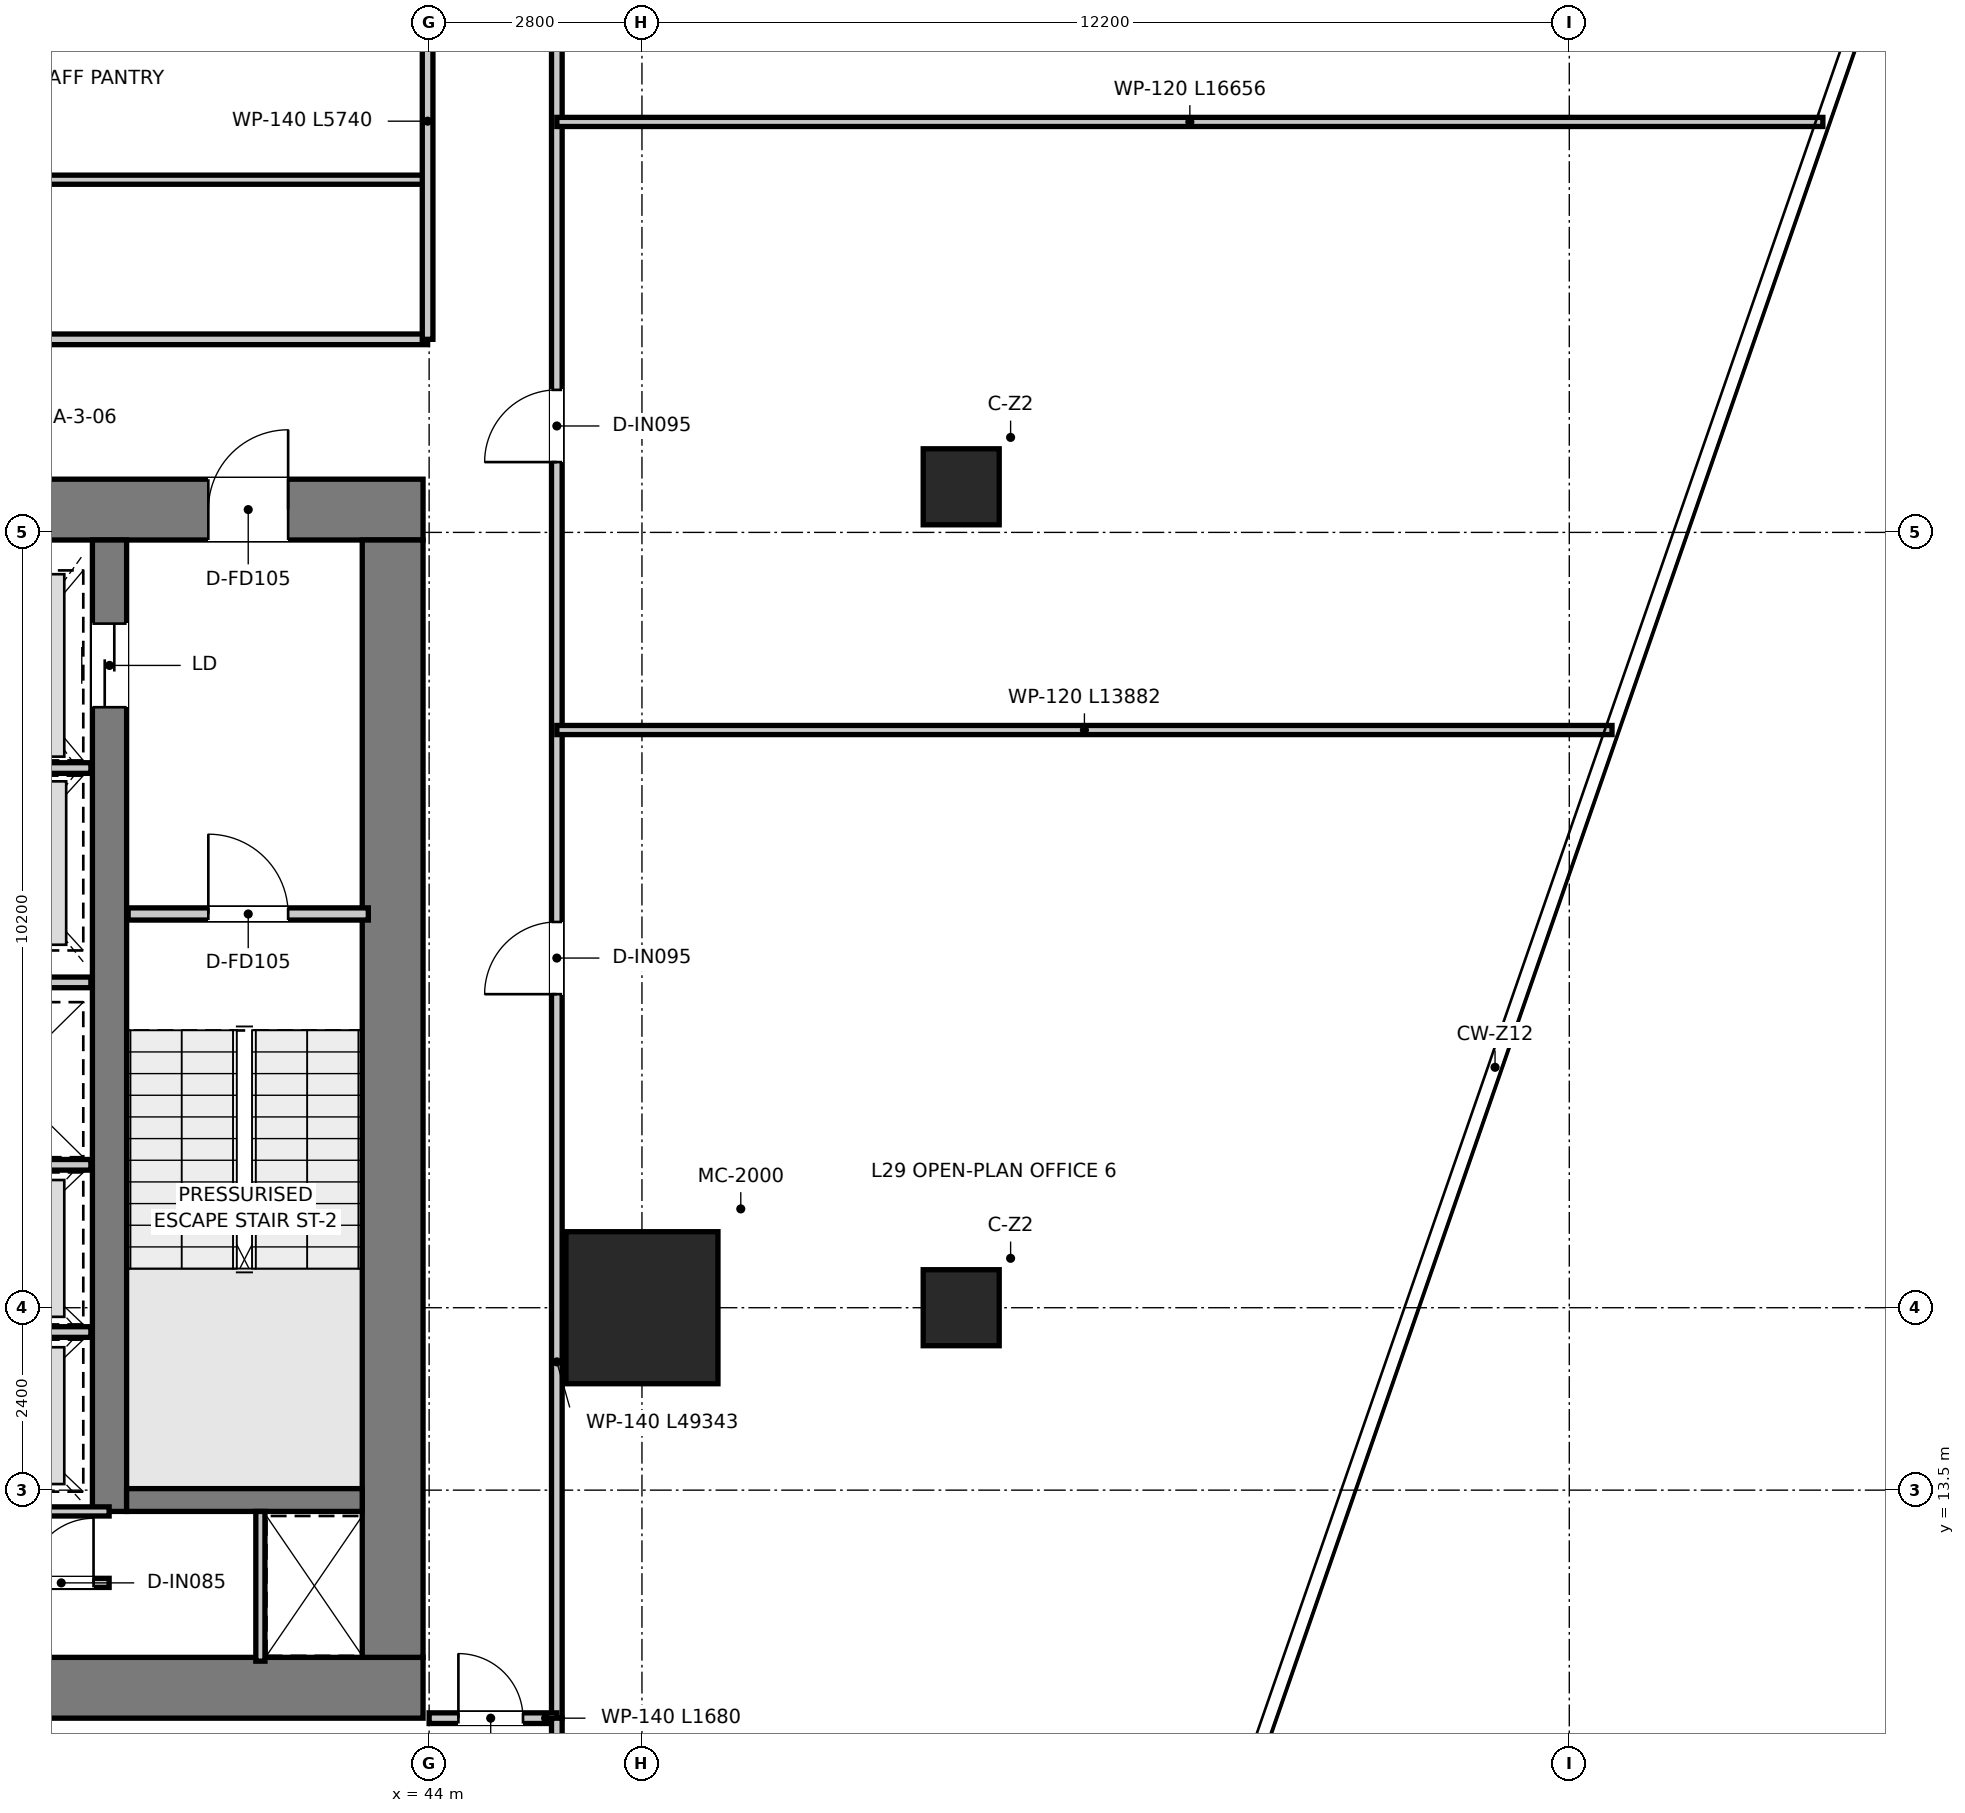
"""IFC4 building model, lengths in metres.
Left out: names, types, materials, properties, quantities, classifications, styles, units other than length and angle.
Written with IfcOpenShell. Run it as: python <this file> out.ifc"""

import sys

from ifc_helpers import new_model, si_unit, direction, frame, frame_2d, origin, origin_2d, place, context, subcontext, project, spatial, rectangle, extrude, source, transform, mapped, element, fill, save


model = new_model("IFC4")
c1 = context("Model", 3, precision=1e-05, world=origin(), true_north=direction((0.0, 1.0)))
c2 = subcontext(c1, "Body", "Model", "MODEL_VIEW")
j1 = project(units=[si_unit("LENGTHUNIT", "METRE"), si_unit("PLANEANGLEUNIT", "RADIAN")], contexts=[c1])
p1 = place(None, origin())
s1 = spatial("IfcSite", under=j1, at=p1, CompositionType="ELEMENT")
p2 = place(p1, origin())
s2 = spatial("IfcBuilding", under=s1, at=p2, CompositionType="ELEMENT")
p3 = place(p2, frame((0.0, 0.0, 121.65)))
s3 = spatial("IfcBuildingStorey", under=s2, at=p3, CompositionType="ELEMENT", Elevation=121.65)
p4 = place(p3, frame((28.08, 10.9, 0.0), z_axis=(0.0, 0.0, 1.0), x_axis=(1.0, 0.0, 0.0)))
e1 = element("IfcWall", 1, at=p4, inside=s3, PredefinedType="SHEAR", context=c2, shape_type="SweptSolid", body=[
    extrude(rectangle(XDim=15.84, YDim=0.8, at=frame_2d((7.92, 0.0))), origin(), (0.0, 0.0, 1.0), 3.95),
])
p5 = place(p3, frame((28.08, 26.4, 0.0), z_axis=(0.0, 0.0, 1.0), x_axis=(1.0, 0.0, 0.0)))
e2 = element("IfcWall", 2, at=p5, inside=s3, PredefinedType="SHEAR", context=c2, shape_type="SweptSolid", body=[
    extrude(rectangle(XDim=15.84, YDim=0.8, at=frame_2d((7.92, 0.0))), origin(), (0.0, 0.0, 1.0), 3.95),
])
p6 = place(p5, frame((7.22, 0.0, 0.0)))
e3 = element("IfcOpeningElement", 3, at=p6, cuts=e2, PredefinedType="OPENING", context=c2, shape_type="SweptSolid", body=[
    extrude(rectangle(XDim=1.4, YDim=2.2, at=frame_2d((0.7, 1.1))), frame((0.0, 0.41, 0.0), z_axis=(0.0, -1.0, 0.0), x_axis=(1.0, 0.0, 0.0)), (0.0, 0.0, 1.0), 0.82),
])
p7 = place(p5, frame((1.775, 0.0, 0.0)))
e4 = element("IfcOpeningElement", 4, at=p7, cuts=e2, PredefinedType="OPENING", context=c2, shape_type="SweptSolid", body=[
    extrude(rectangle(XDim=1.05, YDim=2.1, at=frame_2d((0.525, 1.05))), frame((0.0, 0.41, 0.0), z_axis=(0.0, -1.0, 0.0), x_axis=(1.0, 0.0, 0.0)), (0.0, 0.0, 1.0), 0.82),
])
p8 = place(p5, frame((13.015, 0.0, 0.0)))
e5 = element("IfcOpeningElement", 5, at=p8, cuts=e2, PredefinedType="OPENING", context=c2, shape_type="SweptSolid", body=[
    extrude(rectangle(XDim=1.05, YDim=2.1, at=frame_2d((0.525, 1.05))), frame((0.0, 0.41, 0.0), z_axis=(0.0, -1.0, 0.0), x_axis=(1.0, 0.0, 0.0)), (0.0, 0.0, 1.0), 0.82),
])
p9 = place(p3, frame((43.52, 11.3, 0.0), z_axis=(0.0, 0.0, 1.0), x_axis=(0.0, 1.0, 0.0)))
e6 = element("IfcWall", 6, at=p9, inside=s3, PredefinedType="SHEAR", context=c2, shape_type="SweptSolid", body=[
    extrude(rectangle(XDim=14.7, YDim=0.8, at=frame_2d((7.35, 0.0))), origin(), (0.0, 0.0, 1.0), 3.95),
])
p10 = place(p3, frame((39.795, 13.22, 0.0), z_axis=(0.0, 0.0, 1.0), x_axis=(0.0, 1.0, 0.0)))
e7 = element("IfcWall", 7, at=p10, inside=s3, PredefinedType="SHEAR", context=c2, shape_type="SweptSolid", body=[
    extrude(rectangle(XDim=12.78, YDim=0.45, at=frame_2d((6.39, 0.0))), origin(), (0.0, 0.0, 1.0), 3.95),
])
p11 = place(p10, frame((10.58, 0.0, 0.0)))
e8 = element("IfcOpeningElement", 8, at=p11, cuts=e7, PredefinedType="OPENING", context=c2, shape_type="SweptSolid", body=[
    extrude(rectangle(XDim=1.1, YDim=2.15, at=frame_2d((0.55, 1.075))), frame((0.0, 0.235, 0.0), z_axis=(0.0, -1.0, 0.0), x_axis=(1.0, 0.0, 0.0)), (0.0, 0.0, 1.0), 0.47),
])
p12 = place(p3, frame((40.02, 13.37, 0.0), z_axis=(0.0, 0.0, 1.0), x_axis=(1.0, 0.0, 0.0)))
e9 = element("IfcWall", 9, at=p12, inside=s3, PredefinedType="SHEAR", context=c2, shape_type="SweptSolid", body=[
    extrude(rectangle(XDim=3.1, YDim=0.3, at=frame_2d((1.55, 0.0))), origin(), (0.0, 0.0, 1.0), 3.95),
])
m1 = source(origin(), c2, "Body", "SweptSolid", [
    extrude(rectangle(XDim=2.0, YDim=2.0, at=origin_2d()), origin(), (0.0, 0.0, 1.0), 3.95),
])
p13 = place(p3, frame((46.8, 15.9, 0.0), z_axis=(0.0, 0.0, 1.0), x_axis=(1.0, 0.0, 0.0)))
e10 = element("IfcColumn", 10, at=p13, inside=s3, PredefinedType="USERDEFINED", context=c2, shape_type="MappedRepresentation", body=[
    mapped(m1, transform((0.0, 0.0, 0.0), x_axis=(1.0, 0.0, 0.0), y_axis=(0.0, 1.0, 0.0), z_axis=(0.0, 0.0, 1.0), scale=1.0)),
])
m2 = source(origin(), c2, "Body", "SweptSolid", [
    extrude(rectangle(XDim=1.0, YDim=1.0, at=origin_2d()), origin(), (0.0, 0.0, 1.0), 3.95),
])
for number, where, z_axis, x_axis in (
    (11, (51.0, 26.7, 0.0), (0.0, 0.0, 1.0), (1.0, 0.0, 0.0)),
    (12, (51.0, 15.9, 0.0), (0.0, 0.0, 1.0), (1.0, 0.0, 0.0)),
):
    element("IfcColumn", number, at=place(p3, frame(where, z_axis=z_axis, x_axis=x_axis)), inside=s3, PredefinedType="COLUMN", context=c2, shape_type="MappedRepresentation", body=[
        mapped(m2, transform((0.0, 0.0, 0.0), x_axis=(1.0, 0.0, 0.0), y_axis=(0.0, 1.0, 0.0), z_axis=(0.0, 0.0, 1.0), scale=1.0)),
    ])
p14 = place(p3, frame((40.04, 21.08, 0.0), z_axis=(0.0, 0.0, 1.0), x_axis=(1.0, 0.0, 0.0)))
e13 = element("IfcWall", 13, at=p14, inside=s3, PredefinedType="PARTITIONING", context=c2, shape_type="SweptSolid", body=[
    extrude(rectangle(XDim=3.16, YDim=0.16, at=frame_2d((1.58, 0.0))), origin(), (0.0, 0.0, 1.0), 3.67),
])
p15 = place(p14, frame((1.055, 0.0, 0.0)))
e14 = element("IfcOpeningElement", 14, at=p15, cuts=e13, PredefinedType="OPENING", context=c2, shape_type="SweptSolid", body=[
    extrude(rectangle(XDim=1.05, YDim=2.1, at=frame_2d((0.525, 1.05))), frame((0.0, 0.09, 0.0), z_axis=(0.0, -1.0, 0.0), x_axis=(1.0, 0.0, 0.0)), (0.0, 0.0, 1.0), 0.18),
])
p16 = place(p3, frame((37.28, 23.0, 0.0), z_axis=(0.0, 0.0, 1.0), x_axis=(1.0, 0.0, 0.0)))
e15 = element("IfcWall", 15, at=p16, inside=s3, PredefinedType="PARTITIONING", context=c2, shape_type="SweptSolid", body=[
    extrude(rectangle(XDim=2.27, YDim=0.14, at=frame_2d((1.135, 0.0))), origin(), (0.0, 0.0, 1.0), 2.67),
])
for number, where, z_axis, x_axis in (
    (16, (37.28, 17.78, 0.0), (0.0, 0.0, 1.0), (1.0, 0.0, 0.0)),
    (17, (37.28, 20.18, 0.0), (0.0, 0.0, 1.0), (1.0, 0.0, 0.0)),
    (18, (37.28, 15.58, 0.0), (0.0, 0.0, 1.0), (1.0, 0.0, 0.0)),
):
    element("IfcWall", number, at=place(p3, frame(where, z_axis=z_axis, x_axis=x_axis)), inside=s3, PredefinedType="PARTITIONING", context=c2, shape_type="SweptSolid", body=[
        extrude(rectangle(XDim=2.27, YDim=0.14, at=frame_2d((1.135, 0.0))), origin(), (0.0, 0.0, 1.0), 3.67),
    ])
p17 = place(p3, frame((41.78, 11.25, 0.0), z_axis=(0.0, 0.0, 1.0), x_axis=(0.0, 1.0, 0.0)))
e19 = element("IfcWall", 19, at=p17, inside=s3, PredefinedType="PARTITIONING", context=c2, shape_type="SweptSolid", body=[
    extrude(rectangle(XDim=1.97, YDim=0.12, at=frame_2d((0.985, 0.0))), origin(), (0.0, 0.0, 1.0), 3.67),
])
p18 = place(p3, frame((32.21, 13.22, 0.0), z_axis=(0.0, 0.0, 1.0), x_axis=(1.0, 0.0, 0.0)))
e20 = element("IfcWall", 20, at=p18, inside=s3, PredefinedType="PARTITIONING", context=c2, shape_type="SweptSolid", body=[
    extrude(rectangle(XDim=7.58, YDim=0.12, at=frame_2d((3.79, 0.0))), origin(), (0.0, 0.0, 1.0), 3.67),
])
p19 = place(p18, frame((3.365, 0.0, 0.0)))
e21 = element("IfcOpeningElement", 21, at=p19, cuts=e20, PredefinedType="OPENING", context=c2, shape_type="SweptSolid", body=[
    extrude(rectangle(XDim=0.85, YDim=2.1, at=frame_2d((0.425, 1.05))), frame((0.0, 0.07, 0.0), z_axis=(0.0, -1.0, 0.0), x_axis=(1.0, 0.0, 0.0)), (0.0, 0.0, 1.0), 0.14),
])
p20 = place(p3, frame((32.21, 12.28, 0.0), z_axis=(0.0, 0.0, 1.0), x_axis=(1.0, 0.0, 0.0)))
e22 = element("IfcWall", 22, at=p20, inside=s3, PredefinedType="PARTITIONING", context=c2, shape_type="SweptSolid", body=[
    extrude(rectangle(XDim=7.58, YDim=0.12, at=frame_2d((3.79, 0.0))), origin(), (0.0, 0.0, 1.0), 3.67),
])
p21 = place(p20, frame((0.205, 0.0, 0.0)))
e23 = element("IfcOpeningElement", 23, at=p21, cuts=e22, PredefinedType="OPENING", context=c2, shape_type="SweptSolid", body=[
    extrude(rectangle(XDim=0.85, YDim=2.1, at=frame_2d((0.425, 1.05))), frame((0.0, 0.07, 0.0), z_axis=(0.0, -1.0, 0.0), x_axis=(1.0, 0.0, 0.0)), (0.0, 0.0, 1.0), 0.14),
])
p22 = place(p20, frame((2.095, 0.0, 0.0)))
e24 = element("IfcOpeningElement", 24, at=p22, cuts=e22, PredefinedType="OPENING", context=c2, shape_type="SweptSolid", body=[
    extrude(rectangle(XDim=0.85, YDim=2.1, at=frame_2d((0.425, 1.05))), frame((0.0, 0.07, 0.0), z_axis=(0.0, -1.0, 0.0), x_axis=(1.0, 0.0, 0.0)), (0.0, 0.0, 1.0), 0.14),
])
p23 = place(p20, frame((4.635, 0.0, 0.0)))
e25 = element("IfcOpeningElement", 25, at=p23, cuts=e22, PredefinedType="OPENING", context=c2, shape_type="SweptSolid", body=[
    extrude(rectangle(XDim=0.85, YDim=2.1, at=frame_2d((0.425, 1.05))), frame((0.0, 0.07, 0.0), z_axis=(0.0, -1.0, 0.0), x_axis=(1.0, 0.0, 0.0)), (0.0, 0.0, 1.0), 0.14),
])
p24 = place(p20, frame((6.525, 0.0, 0.0)))
e26 = element("IfcOpeningElement", 26, at=p24, cuts=e22, PredefinedType="OPENING", context=c2, shape_type="SweptSolid", body=[
    extrude(rectangle(XDim=0.85, YDim=2.1, at=frame_2d((0.425, 1.05))), frame((0.0, 0.07, 0.0), z_axis=(0.0, -1.0, 0.0), x_axis=(1.0, 0.0, 0.0)), (0.0, 0.0, 1.0), 0.14),
])
p25 = place(p3, frame((28.02, 28.64, 0.0), z_axis=(0.0, 0.0, 1.0), x_axis=(1.0, 0.0, 0.0)))
e27 = element("IfcWall", 27, at=p25, inside=s3, PredefinedType="PARTITIONING", context=c2, shape_type="SweptSolid", body=[
    extrude(rectangle(XDim=15.96, YDim=0.14, at=frame_2d((7.98, 0.0))), origin(), (0.0, 0.0, 1.0), 3.08),
])
p26 = place(p25, frame((7.455, 0.0, 0.0)))
e28 = element("IfcOpeningElement", 28, at=p26, cuts=e27, PredefinedType="OPENING", context=c2, shape_type="SweptSolid", body=[
    extrude(rectangle(XDim=1.05, YDim=2.15, at=frame_2d((0.525, 1.075))), frame((0.0, 0.08, 0.0), z_axis=(0.0, -1.0, 0.0), x_axis=(1.0, 0.0, 0.0)), (0.0, 0.0, 1.0), 0.16),
])
p27 = place(p3, frame((28.02, 30.74, 0.0), z_axis=(0.0, 0.0, 1.0), x_axis=(1.0, 0.0, 0.0)))
e29 = element("IfcWall", 29, at=p27, inside=s3, PredefinedType="PARTITIONING", context=c2, shape_type="SweptSolid", body=[
    extrude(rectangle(XDim=15.96, YDim=0.12, at=frame_2d((7.98, 0.0))), origin(), (0.0, 0.0, 1.0), 3.08),
])
p28 = place(p3, frame((43.98, 28.64, 0.0), z_axis=(0.0, 0.0, 1.0), x_axis=(0.0, 1.0, 0.0)))
e30 = element("IfcWall", 30, at=p28, inside=s3, PredefinedType="PARTITIONING", context=c2, shape_type="SweptSolid", body=[
    extrude(rectangle(XDim=5.74, YDim=0.14, at=frame_2d((2.87, 0.0))), origin(), (0.0, 0.0, 1.0), 3.27),
])
p29 = place(p3, frame((45.68, 10.5, 0.0), z_axis=(0.0, 0.0, 1.0), x_axis=(0.0, 1.0, 0.0)))
e31 = element("IfcWall", 31, at=p29, inside=s3, PredefinedType="PARTITIONING", context=c2, shape_type="SweptSolid", body=[
    extrude(rectangle(XDim=25.62, YDim=0.14, at=frame_2d((12.81, 0.0))), origin(), (0.0, 0.0, 1.0), 2.97),
])
p30 = place(p29, frame((9.525, 0.0, 0.0)))
e32 = element("IfcOpeningElement", 32, at=p30, cuts=e31, PredefinedType="OPENING", context=c2, shape_type="SweptSolid", body=[
    extrude(rectangle(XDim=0.95, YDim=2.1, at=frame_2d((0.475, 1.05))), frame((0.0, 0.08, 0.0), z_axis=(0.0, -1.0, 0.0), x_axis=(1.0, 0.0, 0.0)), (0.0, 0.0, 1.0), 0.16),
])
p31 = place(p29, frame((16.525, 0.0, 0.0)))
e33 = element("IfcOpeningElement", 33, at=p31, cuts=e31, PredefinedType="OPENING", context=c2, shape_type="SweptSolid", body=[
    extrude(rectangle(XDim=0.95, YDim=2.1, at=frame_2d((0.475, 1.05))), frame((0.0, 0.08, 0.0), z_axis=(0.0, -1.0, 0.0), x_axis=(1.0, 0.0, 0.0)), (0.0, 0.0, 1.0), 0.16),
])
p32 = place(p29, frame((22.125, 0.0, 0.0)))
e34 = element("IfcOpeningElement", 34, at=p32, cuts=e31, PredefinedType="OPENING", context=c2, shape_type="SweptSolid", body=[
    extrude(rectangle(XDim=0.95, YDim=2.1, at=frame_2d((0.475, 1.05))), frame((0.0, 0.08, 0.0), z_axis=(0.0, -1.0, 0.0), x_axis=(1.0, 0.0, 0.0)), (0.0, 0.0, 1.0), 0.16),
])
p33 = place(p3, frame((44.0, 10.5, 0.0), z_axis=(0.0, 0.0, 1.0), x_axis=(1.0, 0.0, 0.0)))
e35 = element("IfcWall", 35, at=p33, inside=s3, PredefinedType="PARTITIONING", context=c2, shape_type="SweptSolid", body=[
    extrude(rectangle(XDim=1.68, YDim=0.14, at=frame_2d((0.84, 0.0))), origin(), (0.0, 0.0, 1.0), 3.67),
])
p34 = place(p33, frame((0.385, 0.0, 0.0)))
e36 = element("IfcOpeningElement", 36, at=p34, cuts=e35, PredefinedType="OPENING", context=c2, shape_type="SweptSolid", body=[
    extrude(rectangle(XDim=0.85, YDim=2.1, at=frame_2d((0.425, 1.05))), frame((0.0, 0.08, 0.0), z_axis=(0.0, -1.0, 0.0), x_axis=(1.0, 0.0, 0.0)), (0.0, 0.0, 1.0), 0.16),
])
p35 = place(p3, frame((45.68, -1.329, 0.0), z_axis=(0.0, 0.0, 1.0), x_axis=(0.0, 1.0, 0.0)))
e37 = element("IfcWall", 37, at=p35, inside=s3, PredefinedType="PARTITIONING", context=c2, shape_type="SweptSolid", body=[
    extrude(rectangle(XDim=11.829, YDim=0.14, at=frame_2d((5.914, 0.0))), origin(), (0.0, 0.0, 1.0), 3.67),
])
p36 = place(p3, frame((45.68, 23.5, 0.0), z_axis=(0.0, 0.0, 1.0), x_axis=(1.0, 0.0, 0.0)))
e38 = element("IfcWall", 38, at=p36, inside=s3, PredefinedType="PARTITIONING", context=c2, shape_type="SweptSolid", body=[
    extrude(rectangle(XDim=13.882, YDim=0.12, at=frame_2d((6.941, 0.0))), origin(), (0.0, 0.0, 1.0), 2.97),
])
p37 = place(p3, frame((45.68, 31.5, 0.0), z_axis=(0.0, 0.0, 1.0), x_axis=(1.0, 0.0, 0.0)))
e39 = element("IfcWall", 39, at=p37, inside=s3, PredefinedType="PARTITIONING", context=c2, shape_type="SweptSolid", body=[
    extrude(rectangle(XDim=16.656, YDim=0.12, at=frame_2d((8.328, 0.0))), origin(), (0.0, 0.0, 1.0), 2.97),
])
p38 = place(p15, origin())
e40 = element("IfcDoor", 40, at=p38, inside=s3, OperationType="SINGLE_SWING_LEFT", PredefinedType="DOOR", context=c2, shape_type="SweptSolid", body=[
    extrude(rectangle(XDim=1.05, YDim=2.1, at=frame_2d((0.525, 1.05))), frame((0.0, 0.025, 0.0), z_axis=(0.0, -1.0, 0.0), x_axis=(1.0, 0.0, 0.0)), (0.0, 0.0, 1.0), 0.05),
])
fill(e14, e40)
p39 = place(p8, origin())
e41 = element("IfcDoor", 41, at=p39, inside=s3, OperationType="SINGLE_SWING_RIGHT", PredefinedType="DOOR", context=c2, shape_type="SweptSolid", body=[
    extrude(rectangle(XDim=1.05, YDim=2.1, at=frame_2d((0.525, 1.05))), frame((0.0, 0.025, 0.0), z_axis=(0.0, -1.0, 0.0), x_axis=(1.0, 0.0, 0.0)), (0.0, 0.0, 1.0), 0.05),
])
fill(e5, e41)
p40 = place(p11, origin())
e42 = element("IfcDoor", 42, at=p40, inside=s3, OperationType="DOUBLE_DOOR_SLIDING", PredefinedType="DOOR", context=c2, shape_type="SweptSolid", body=[
    extrude(rectangle(XDim=1.1, YDim=2.15, at=frame_2d((0.55, 1.075))), frame((0.0, 0.025, 0.0), z_axis=(0.0, -1.0, 0.0), x_axis=(1.0, 0.0, 0.0)), (0.0, 0.0, 1.0), 0.05),
])
fill(e8, e42)
p41 = place(p24, origin())
e43 = element("IfcDoor", 43, at=p41, inside=s3, OperationType="SINGLE_SWING_RIGHT", PredefinedType="DOOR", context=c2, shape_type="SweptSolid", body=[
    extrude(rectangle(XDim=0.85, YDim=2.1, at=frame_2d((0.425, 1.05))), frame((0.0, 0.025, 0.0), z_axis=(0.0, -1.0, 0.0), x_axis=(1.0, 0.0, 0.0)), (0.0, 0.0, 1.0), 0.05),
])
fill(e26, e43)
p42 = place(p30, origin())
e44 = element("IfcDoor", 44, at=p42, inside=s3, OperationType="SINGLE_SWING_LEFT", PredefinedType="DOOR", context=c2, shape_type="SweptSolid", body=[
    extrude(rectangle(XDim=0.95, YDim=2.1, at=frame_2d((0.475, 1.05))), frame((0.0, 0.025, 0.0), z_axis=(0.0, -1.0, 0.0), x_axis=(1.0, 0.0, 0.0)), (0.0, 0.0, 1.0), 0.05),
])
fill(e32, e44)
p43 = place(p31, origin())
e45 = element("IfcDoor", 45, at=p43, inside=s3, OperationType="SINGLE_SWING_LEFT", PredefinedType="DOOR", context=c2, shape_type="SweptSolid", body=[
    extrude(rectangle(XDim=0.95, YDim=2.1, at=frame_2d((0.475, 1.05))), frame((0.0, 0.025, 0.0), z_axis=(0.0, -1.0, 0.0), x_axis=(1.0, 0.0, 0.0)), (0.0, 0.0, 1.0), 0.05),
])
fill(e33, e45)
p44 = place(p34, origin())
e46 = element("IfcDoor", 46, at=p44, inside=s3, OperationType="SINGLE_SWING_LEFT", PredefinedType="DOOR", context=c2, shape_type="SweptSolid", body=[
    extrude(rectangle(XDim=0.85, YDim=2.1, at=frame_2d((0.425, 1.05))), frame((0.0, 0.025, 0.0), z_axis=(0.0, -1.0, 0.0), x_axis=(1.0, 0.0, 0.0)), (0.0, 0.0, 1.0), 0.05),
])
fill(e36, e46)
save(model, sys.argv[1])
